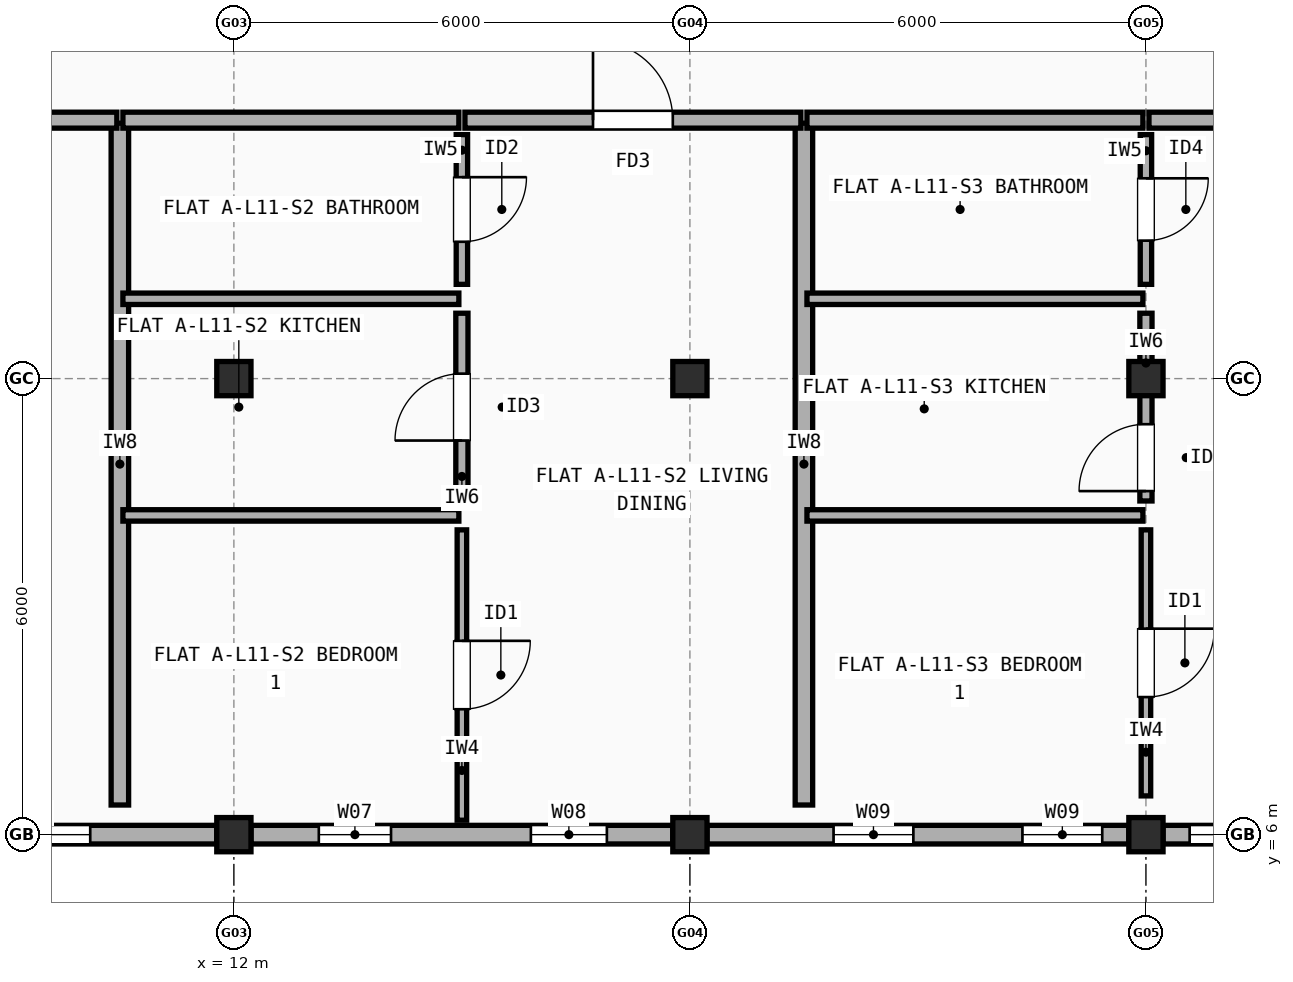
"""IFC4 building model, lengths in metres.
Left out: names, types, materials, properties, quantities, classifications, styles, units other than length and angle.
Written with IfcOpenShell. Run it as: python <this file> out.ifc"""

import sys

from ifc_helpers import new_model, si_unit, direction, frame, frame_2d, origin, origin_2d, place, context, subcontext, project, spatial, rectangle, extrude, element, fill, save


model = new_model("IFC4")
c1 = context("Model", 3, precision=1e-05, world=origin(), true_north=direction((0.0, 1.0)))
c2 = subcontext(c1, "Body", "Model", "MODEL_VIEW")
j1 = project(units=[si_unit("LENGTHUNIT", "METRE"), si_unit("PLANEANGLEUNIT", "RADIAN")], contexts=[c1])
p1 = place(None, origin())
s1 = spatial("IfcSite", under=j1, at=p1, CompositionType="ELEMENT")
p2 = place(p1, origin())
s2 = spatial("IfcBuilding", under=s1, at=p2, CompositionType="ELEMENT")
p3 = place(p2, frame((0.0, 0.0, 36.5)))
s3 = spatial("IfcBuildingStorey", under=s2, at=p3, CompositionType="ELEMENT", Elevation=36.5)
for number, where, z_axis, x_axis in (
    (1, (12.0, 6.0, 0.0), (0.0, 0.0, 1.0), (1.0, 0.0, 0.0)),
    (2, (12.0, 12.0, 0.0), (0.0, 0.0, 1.0), (1.0, 0.0, 0.0)),
    (3, (18.0, 6.0, 0.0), (0.0, 0.0, 1.0), (1.0, 0.0, 0.0)),
    (4, (18.0, 12.0, 0.0), (0.0, 0.0, 1.0), (1.0, 0.0, 0.0)),
    (5, (24.0, 6.0, 0.0), (0.0, 0.0, 1.0), (1.0, 0.0, 0.0)),
    (6, (24.0, 12.0, 0.0), (0.0, 0.0, 1.0), (1.0, 0.0, 0.0)),
):
    element("IfcColumn", number, at=place(p3, frame(where, z_axis=z_axis, x_axis=x_axis)), inside=s3, PredefinedType="COLUMN", context=c2, shape_type="SweptSolid", body=[
        extrude(rectangle(XDim=0.45, YDim=0.45, at=origin_2d()), origin(), (0.0, 0.0, 1.0), 2.995),
    ])
p4 = place(p3, frame((6.225, 6.0, 0.0), z_axis=(0.0, 0.0, 1.0), x_axis=(1.0, 0.0, 0.0)))
e7 = element("IfcWall", 7, at=p4, inside=s3, PredefinedType="STANDARD", context=c2, shape_type="SweptSolid", body=[
    extrude(rectangle(XDim=5.55, YDim=0.245, at=frame_2d((2.775, 0.0))), origin(), (0.0, 0.0, 1.0), 2.477),
])
p5 = place(p4, frame((0.35, 0.0, 0.9)))
e8 = element("IfcOpeningElement", 8, at=p5, cuts=e7, PredefinedType="OPENING", context=c2, shape_type="SweptSolid", body=[
    extrude(rectangle(XDim=1.5, YDim=1.4, at=frame_2d((0.75, 0.7))), frame((0.0, 0.133, 0.0), z_axis=(0.0, -1.0, 0.0), x_axis=(1.0, 0.0, 0.0)), (0.0, 0.0, 1.0), 0.265),
])
p6 = place(p4, frame((2.385, 0.0, 0.9)))
e9 = element("IfcOpeningElement", 9, at=p6, cuts=e7, PredefinedType="OPENING", context=c2, shape_type="SweptSolid", body=[
    extrude(rectangle(XDim=1.5, YDim=1.4, at=frame_2d((0.75, 0.7))), frame((0.0, 0.133, 0.0), z_axis=(0.0, -1.0, 0.0), x_axis=(1.0, 0.0, 0.0)), (0.0, 0.0, 1.0), 0.265),
])
p7 = place(p3, frame((12.225, 6.0, 0.0), z_axis=(0.0, 0.0, 1.0), x_axis=(1.0, 0.0, 0.0)))
e10 = element("IfcWall", 10, at=p7, inside=s3, PredefinedType="STANDARD", context=c2, shape_type="SweptSolid", body=[
    extrude(rectangle(XDim=5.55, YDim=0.245, at=frame_2d((2.775, 0.0))), origin(), (0.0, 0.0, 1.0), 2.477),
])
p8 = place(p7, frame((0.893, 0.0, 0.9)))
e11 = element("IfcOpeningElement", 11, at=p8, cuts=e10, PredefinedType="OPENING", context=c2, shape_type="SweptSolid", body=[
    extrude(rectangle(XDim=0.95, YDim=1.35, at=frame_2d((0.475, 0.675))), frame((0.0, 0.133, 0.0), z_axis=(0.0, -1.0, 0.0), x_axis=(1.0, 0.0, 0.0)), (0.0, 0.0, 1.0), 0.265),
])
p9 = place(p7, frame((3.683, 0.0, 0.9)))
e12 = element("IfcOpeningElement", 12, at=p9, cuts=e10, PredefinedType="OPENING", context=c2, shape_type="SweptSolid", body=[
    extrude(rectangle(XDim=1.0, YDim=1.4, at=frame_2d((0.5, 0.7))), frame((0.0, 0.133, 0.0), z_axis=(0.0, -1.0, 0.0), x_axis=(1.0, 0.0, 0.0)), (0.0, 0.0, 1.0), 0.265),
])
p10 = place(p3, frame((18.225, 6.0, 0.0), z_axis=(0.0, 0.0, 1.0), x_axis=(1.0, 0.0, 0.0)))
e13 = element("IfcWall", 13, at=p10, inside=s3, PredefinedType="STANDARD", context=c2, shape_type="SweptSolid", body=[
    extrude(rectangle(XDim=5.55, YDim=0.245, at=frame_2d((2.775, 0.0))), origin(), (0.0, 0.0, 1.0), 2.477),
])
p11 = place(p10, frame((1.665, 0.0, 0.9)))
e14 = element("IfcOpeningElement", 14, at=p11, cuts=e13, PredefinedType="OPENING", context=c2, shape_type="SweptSolid", body=[
    extrude(rectangle(XDim=1.05, YDim=1.35, at=frame_2d((0.525, 0.675))), frame((0.0, 0.133, 0.0), z_axis=(0.0, -1.0, 0.0), x_axis=(1.0, 0.0, 0.0)), (0.0, 0.0, 1.0), 0.265),
])
p12 = place(p10, frame((4.15, 0.0, 0.9)))
e15 = element("IfcOpeningElement", 15, at=p12, cuts=e13, PredefinedType="OPENING", context=c2, shape_type="SweptSolid", body=[
    extrude(rectangle(XDim=1.05, YDim=1.35, at=frame_2d((0.525, 0.675))), frame((0.0, 0.133, 0.0), z_axis=(0.0, -1.0, 0.0), x_axis=(1.0, 0.0, 0.0)), (0.0, 0.0, 1.0), 0.265),
])
p13 = place(p3, frame((24.225, 6.0, 0.0), z_axis=(0.0, 0.0, 1.0), x_axis=(1.0, 0.0, 0.0)))
e16 = element("IfcWall", 16, at=p13, inside=s3, PredefinedType="STANDARD", context=c2, shape_type="SweptSolid", body=[
    extrude(rectangle(XDim=5.575, YDim=0.245, at=frame_2d((2.788, 0.0))), origin(), (0.0, 0.0, 1.0), 2.477),
])
p14 = place(p13, frame((0.35, 0.0, 0.9)))
e17 = element("IfcOpeningElement", 17, at=p14, cuts=e16, PredefinedType="OPENING", context=c2, shape_type="SweptSolid", body=[
    extrude(rectangle(XDim=1.5, YDim=1.4, at=frame_2d((0.75, 0.7))), frame((0.0, 0.133, 0.0), z_axis=(0.0, -1.0, 0.0), x_axis=(1.0, 0.0, 0.0)), (0.0, 0.0, 1.0), 0.265),
])
p15 = place(p13, frame((3.725, 0.0, 0.9)))
e18 = element("IfcOpeningElement", 18, at=p15, cuts=e16, PredefinedType="OPENING", context=c2, shape_type="SweptSolid", body=[
    extrude(rectangle(XDim=1.5, YDim=1.4, at=frame_2d((0.75, 0.7))), frame((0.0, 0.133, 0.0), z_axis=(0.0, -1.0, 0.0), x_axis=(1.0, 0.0, 0.0)), (0.0, 0.0, 1.0), 0.265),
])
p16 = place(p3, frame((10.5, 6.39, 0.0), z_axis=(0.0, 0.0, 1.0), x_axis=(0.0, 1.0, 0.0)))
e19 = element("IfcWall", 19, at=p16, inside=s3, PredefinedType="SOLIDWALL", context=c2, shape_type="SweptSolid", body=[
    extrude(rectangle(XDim=8.97, YDim=0.23, at=frame_2d((4.485, 0.0))), origin(), (0.0, 0.0, 1.0), 2.527),
])
p17 = place(p3, frame((4.54, 15.4, 0.0), z_axis=(0.0, 0.0, 1.0), x_axis=(1.0, 0.0, 0.0)))
e20 = element("IfcWall", 20, at=p17, inside=s3, PredefinedType="SOLIDWALL", context=c2, shape_type="SweptSolid", body=[
    extrude(rectangle(XDim=5.92, YDim=0.21, at=frame_2d((2.96, 0.0))), origin(), (0.0, 0.0, 1.0), 2.458),
])
p18 = place(p17, frame((2.47, 0.0, 0.0)))
e21 = element("IfcOpeningElement", 21, at=p18, cuts=e20, PredefinedType="OPENING", context=c2, shape_type="SweptSolid", body=[
    extrude(rectangle(XDim=0.98, YDim=2.15, at=frame_2d((0.49, 1.075))), frame((0.0, 0.115, 0.0), z_axis=(0.0, -1.0, 0.0), x_axis=(1.0, 0.0, 0.0)), (0.0, 0.0, 1.0), 0.23),
])
p19 = place(p3, frame((19.5, 6.39, 0.0), z_axis=(0.0, 0.0, 1.0), x_axis=(0.0, 1.0, 0.0)))
e22 = element("IfcWall", 22, at=p19, inside=s3, PredefinedType="SOLIDWALL", context=c2, shape_type="SweptSolid", body=[
    extrude(rectangle(XDim=8.97, YDim=0.23, at=frame_2d((4.485, 0.0))), origin(), (0.0, 0.0, 1.0), 2.527),
])
p20 = place(p3, frame((10.54, 15.4, 0.0), z_axis=(0.0, 0.0, 1.0), x_axis=(1.0, 0.0, 0.0)))
e23 = element("IfcWall", 23, at=p20, inside=s3, PredefinedType="SOLIDWALL", context=c2, shape_type="SweptSolid", body=[
    extrude(rectangle(XDim=4.42, YDim=0.21, at=frame_2d((2.21, 0.0))), origin(), (0.0, 0.0, 1.0), 2.458),
])
p21 = place(p3, frame((15.04, 15.4, 0.0), z_axis=(0.0, 0.0, 1.0), x_axis=(1.0, 0.0, 0.0)))
e24 = element("IfcWall", 24, at=p21, inside=s3, PredefinedType="SOLIDWALL", context=c2, shape_type="SweptSolid", body=[
    extrude(rectangle(XDim=4.42, YDim=0.21, at=frame_2d((2.21, 0.0))), origin(), (0.0, 0.0, 1.0), 2.548),
])
p22 = place(p21, frame((1.685, 0.0, 0.0)))
e25 = element("IfcOpeningElement", 25, at=p22, cuts=e24, PredefinedType="OPENING", context=c2, shape_type="SweptSolid", body=[
    extrude(rectangle(XDim=1.05, YDim=2.15, at=frame_2d((0.525, 1.075))), frame((0.0, 0.115, 0.0), z_axis=(0.0, -1.0, 0.0), x_axis=(1.0, 0.0, 0.0)), (0.0, 0.0, 1.0), 0.23),
])
p23 = place(p3, frame((15.0, 6.19, 0.0), z_axis=(0.0, 0.0, 1.0), x_axis=(0.0, 1.0, 0.0)))
e26 = element("IfcWall", 26, at=p23, inside=s3, PredefinedType="PARTITIONING", context=c2, shape_type="SweptSolid", body=[
    extrude(rectangle(XDim=3.82, YDim=0.125, at=frame_2d((1.91, 0.0))), origin(), (0.0, 0.0, 1.0), 2.995),
])
p24 = place(p23, frame((1.46, 0.0, 0.0)))
e27 = element("IfcOpeningElement", 27, at=p24, cuts=e26, PredefinedType="OPENING", context=c2, shape_type="SweptSolid", body=[
    extrude(rectangle(XDim=0.9, YDim=2.1, at=frame_2d((0.45, 1.05))), frame((0.0, 0.073, 0.0), z_axis=(0.0, -1.0, 0.0), x_axis=(1.0, 0.0, 0.0)), (0.0, 0.0, 1.0), 0.145),
])
p25 = place(p3, frame((15.0, 10.39, 0.0), z_axis=(0.0, 0.0, 1.0), x_axis=(0.0, 1.0, 0.0)))
e28 = element("IfcWall", 28, at=p25, inside=s3, PredefinedType="PLUMBINGWALL", context=c2, shape_type="SweptSolid", body=[
    extrude(rectangle(XDim=2.47, YDim=0.16, at=frame_2d((1.235, 0.0))), origin(), (0.0, 0.0, 1.0), 2.527),
])
p26 = place(p25, frame((0.795, 0.0, 0.0)))
e29 = element("IfcOpeningElement", 29, at=p26, cuts=e28, PredefinedType="OPENING", context=c2, shape_type="SweptSolid", body=[
    extrude(rectangle(XDim=0.88, YDim=2.1, at=frame_2d((0.44, 1.05))), frame((0.0, 0.09, 0.0), z_axis=(0.0, -1.0, 0.0), x_axis=(1.0, 0.0, 0.0)), (0.0, 0.0, 1.0), 0.18),
])
p27 = place(p3, frame((15.0, 13.24, 0.0), z_axis=(0.0, 0.0, 1.0), x_axis=(0.0, 1.0, 0.0)))
e30 = element("IfcWall", 30, at=p27, inside=s3, PredefinedType="PARTITIONING", context=c2, shape_type="SweptSolid", body=[
    extrude(rectangle(XDim=1.97, YDim=0.15, at=frame_2d((0.985, 0.0))), origin(), (0.0, 0.0, 1.0), 2.995),
])
p28 = place(p27, frame((0.56, 0.0, 0.0)))
e31 = element("IfcOpeningElement", 31, at=p28, cuts=e30, PredefinedType="OPENING", context=c2, shape_type="SweptSolid", body=[
    extrude(rectangle(XDim=0.85, YDim=2.1, at=frame_2d((0.425, 1.05))), frame((0.0, 0.085, 0.0), z_axis=(0.0, -1.0, 0.0), x_axis=(1.0, 0.0, 0.0)), (0.0, 0.0, 1.0), 0.17),
])
p29 = place(p3, frame((10.54, 10.2, 0.0), z_axis=(0.0, 0.0, 1.0), x_axis=(1.0, 0.0, 0.0)))
e32 = element("IfcWall", 32, at=p29, inside=s3, PredefinedType="PARTITIONING", context=c2, shape_type="SweptSolid", body=[
    extrude(rectangle(XDim=4.42, YDim=0.15, at=frame_2d((2.21, 0.0))), origin(), (0.0, 0.0, 1.0), 2.508),
])
p30 = place(p3, frame((10.54, 13.05, 0.0), z_axis=(0.0, 0.0, 1.0), x_axis=(1.0, 0.0, 0.0)))
e33 = element("IfcWall", 33, at=p30, inside=s3, PredefinedType="PARTITIONING", context=c2, shape_type="SweptSolid", body=[
    extrude(rectangle(XDim=4.42, YDim=0.15, at=frame_2d((2.21, 0.0))), origin(), (0.0, 0.0, 1.0), 2.458),
])
p31 = place(p3, frame((19.54, 15.4, 0.0), z_axis=(0.0, 0.0, 1.0), x_axis=(1.0, 0.0, 0.0)))
e34 = element("IfcWall", 34, at=p31, inside=s3, PredefinedType="SOLIDWALL", context=c2, shape_type="SweptSolid", body=[
    extrude(rectangle(XDim=4.42, YDim=0.21, at=frame_2d((2.21, 0.0))), origin(), (0.0, 0.0, 1.0), 2.548),
])
p32 = place(p3, frame((24.04, 15.4, 0.0), z_axis=(0.0, 0.0, 1.0), x_axis=(1.0, 0.0, 0.0)))
e35 = element("IfcWall", 35, at=p32, inside=s3, PredefinedType="SOLIDWALL", context=c2, shape_type="SweptSolid", body=[
    extrude(rectangle(XDim=5.92, YDim=0.21, at=frame_2d((2.96, 0.0))), origin(), (0.0, 0.0, 1.0), 2.477),
])
p33 = place(p32, frame((2.46, 0.0, 0.0)))
e36 = element("IfcOpeningElement", 36, at=p33, cuts=e35, PredefinedType="OPENING", context=c2, shape_type="SweptSolid", body=[
    extrude(rectangle(XDim=1.0, YDim=2.15, at=frame_2d((0.5, 1.075))), frame((0.0, 0.115, 0.0), z_axis=(0.0, -1.0, 0.0), x_axis=(1.0, 0.0, 0.0)), (0.0, 0.0, 1.0), 0.23),
])
p34 = place(p3, frame((24.0, 6.51, 0.0), z_axis=(0.0, 0.0, 1.0), x_axis=(0.0, 1.0, 0.0)))
e37 = element("IfcWall", 37, at=p34, inside=s3, PredefinedType="PARTITIONING", context=c2, shape_type="SweptSolid", body=[
    extrude(rectangle(XDim=3.5, YDim=0.125, at=frame_2d((1.75, 0.0))), origin(), (0.0, 0.0, 1.0), 2.458),
])
p35 = place(p34, frame((1.3, 0.0, 0.0)))
e38 = element("IfcOpeningElement", 38, at=p35, cuts=e37, PredefinedType="OPENING", context=c2, shape_type="SweptSolid", body=[
    extrude(rectangle(XDim=0.9, YDim=2.1, at=frame_2d((0.45, 1.05))), frame((0.0, 0.073, 0.0), z_axis=(0.0, -1.0, 0.0), x_axis=(1.0, 0.0, 0.0)), (0.0, 0.0, 1.0), 0.145),
])
p36 = place(p3, frame((24.0, 10.39, 0.0), z_axis=(0.0, 0.0, 1.0), x_axis=(0.0, 1.0, 0.0)))
e39 = element("IfcWall", 39, at=p36, inside=s3, PredefinedType="PLUMBINGWALL", context=c2, shape_type="SweptSolid", body=[
    extrude(rectangle(XDim=2.47, YDim=0.16, at=frame_2d((1.235, 0.0))), origin(), (0.0, 0.0, 1.0), 2.458),
])
p37 = place(p36, frame((0.13, 0.0, 0.0)))
e40 = element("IfcOpeningElement", 40, at=p37, cuts=e39, PredefinedType="OPENING", context=c2, shape_type="SweptSolid", body=[
    extrude(rectangle(XDim=0.88, YDim=2.1, at=frame_2d((0.44, 1.05))), frame((0.0, 0.09, 0.0), z_axis=(0.0, -1.0, 0.0), x_axis=(1.0, 0.0, 0.0)), (0.0, 0.0, 1.0), 0.18),
])
p38 = place(p3, frame((24.0, 13.24, 0.0), z_axis=(0.0, 0.0, 1.0), x_axis=(0.0, 1.0, 0.0)))
e41 = element("IfcWall", 41, at=p38, inside=s3, PredefinedType="PARTITIONING", context=c2, shape_type="SweptSolid", body=[
    extrude(rectangle(XDim=1.97, YDim=0.15, at=frame_2d((0.985, 0.0))), origin(), (0.0, 0.0, 1.0), 2.548),
])
p39 = place(p38, frame((0.575, 0.0, 0.0)))
e42 = element("IfcOpeningElement", 42, at=p39, cuts=e41, PredefinedType="OPENING", context=c2, shape_type="SweptSolid", body=[
    extrude(rectangle(XDim=0.82, YDim=2.08, at=frame_2d((0.41, 1.04))), frame((0.0, 0.085, 0.0), z_axis=(0.0, -1.0, 0.0), x_axis=(1.0, 0.0, 0.0)), (0.0, 0.0, 1.0), 0.17),
])
p40 = place(p3, frame((19.54, 10.2, 0.0), z_axis=(0.0, 0.0, 1.0), x_axis=(1.0, 0.0, 0.0)))
e43 = element("IfcWall", 43, at=p40, inside=s3, PredefinedType="PARTITIONING", context=c2, shape_type="SweptSolid", body=[
    extrude(rectangle(XDim=4.42, YDim=0.15, at=frame_2d((2.21, 0.0))), origin(), (0.0, 0.0, 1.0), 2.458),
])
p41 = place(p3, frame((19.54, 13.05, 0.0), z_axis=(0.0, 0.0, 1.0), x_axis=(1.0, 0.0, 0.0)))
e44 = element("IfcWall", 44, at=p41, inside=s3, PredefinedType="PARTITIONING", context=c2, shape_type="SweptSolid", body=[
    extrude(rectangle(XDim=4.42, YDim=0.15, at=frame_2d((2.21, 0.0))), origin(), (0.0, 0.0, 1.0), 2.548),
])
p42 = place(p6, origin())
e45 = element("IfcWindow", 45, at=p42, inside=s3, PartitioningType="SINGLE_PANEL", PredefinedType="WINDOW", context=c2, shape_type="SweptSolid", body=[
    extrude(rectangle(XDim=1.5, YDim=1.4, at=frame_2d((0.75, 0.7))), frame((0.0, 0.03, 0.0), z_axis=(0.0, -1.0, 0.0), x_axis=(1.0, 0.0, 0.0)), (0.0, 0.0, 1.0), 0.06),
])
fill(e9, e45)
p43 = place(p8, origin())
e46 = element("IfcWindow", 46, at=p43, inside=s3, PartitioningType="SINGLE_PANEL", PredefinedType="WINDOW", context=c2, shape_type="SweptSolid", body=[
    extrude(rectangle(XDim=0.95, YDim=1.35, at=frame_2d((0.475, 0.675))), frame((0.0, 0.03, 0.0), z_axis=(0.0, -1.0, 0.0), x_axis=(1.0, 0.0, 0.0)), (0.0, 0.0, 1.0), 0.06),
])
fill(e11, e46)
p44 = place(p9, origin())
e47 = element("IfcWindow", 47, at=p44, inside=s3, PartitioningType="SINGLE_PANEL", PredefinedType="WINDOW", context=c2, shape_type="SweptSolid", body=[
    extrude(rectangle(XDim=1.0, YDim=1.4, at=frame_2d((0.5, 0.7))), frame((0.0, 0.03, 0.0), z_axis=(0.0, -1.0, 0.0), x_axis=(1.0, 0.0, 0.0)), (0.0, 0.0, 1.0), 0.06),
])
fill(e12, e47)
p45 = place(p11, origin())
e48 = element("IfcWindow", 48, at=p45, inside=s3, PartitioningType="SINGLE_PANEL", PredefinedType="WINDOW", context=c2, shape_type="SweptSolid", body=[
    extrude(rectangle(XDim=1.05, YDim=1.35, at=frame_2d((0.525, 0.675))), frame((0.0, 0.03, 0.0), z_axis=(0.0, -1.0, 0.0), x_axis=(1.0, 0.0, 0.0)), (0.0, 0.0, 1.0), 0.06),
])
fill(e14, e48)
p46 = place(p12, origin())
e49 = element("IfcWindow", 49, at=p46, inside=s3, PartitioningType="SINGLE_PANEL", PredefinedType="WINDOW", context=c2, shape_type="SweptSolid", body=[
    extrude(rectangle(XDim=1.05, YDim=1.35, at=frame_2d((0.525, 0.675))), frame((0.0, 0.03, 0.0), z_axis=(0.0, -1.0, 0.0), x_axis=(1.0, 0.0, 0.0)), (0.0, 0.0, 1.0), 0.06),
])
fill(e15, e49)
p47 = place(p14, origin())
e50 = element("IfcWindow", 50, at=p47, inside=s3, PartitioningType="SINGLE_PANEL", PredefinedType="WINDOW", context=c2, shape_type="SweptSolid", body=[
    extrude(rectangle(XDim=1.5, YDim=1.4, at=frame_2d((0.75, 0.7))), frame((0.0, 0.03, 0.0), z_axis=(0.0, -1.0, 0.0), x_axis=(1.0, 0.0, 0.0)), (0.0, 0.0, 1.0), 0.06),
])
fill(e17, e50)
p48 = place(p22, origin())
e51 = element("IfcDoor", 51, at=p48, inside=s3, OperationType="SINGLE_SWING_LEFT", PredefinedType="DOOR", context=c2, shape_type="SweptSolid", body=[
    extrude(rectangle(XDim=1.05, YDim=2.15, at=frame_2d((0.525, 1.075))), frame((0.0, 0.025, 0.0), z_axis=(0.0, -1.0, 0.0), x_axis=(1.0, 0.0, 0.0)), (0.0, 0.0, 1.0), 0.05),
])
fill(e25, e51)
p49 = place(p24, origin())
e52 = element("IfcDoor", 52, at=p49, inside=s3, OperationType="SINGLE_SWING_RIGHT", PredefinedType="DOOR", context=c2, shape_type="SweptSolid", body=[
    extrude(rectangle(XDim=0.9, YDim=2.1, at=frame_2d((0.45, 1.05))), frame((0.0, 0.025, 0.0), z_axis=(0.0, -1.0, 0.0), x_axis=(1.0, 0.0, 0.0)), (0.0, 0.0, 1.0), 0.05),
])
fill(e27, e52)
p50 = place(p26, origin())
e53 = element("IfcDoor", 53, at=p50, inside=s3, OperationType="SINGLE_SWING_LEFT", PredefinedType="DOOR", context=c2, shape_type="SweptSolid", body=[
    extrude(rectangle(XDim=0.88, YDim=2.1, at=frame_2d((0.44, 1.05))), frame((0.0, 0.025, 0.0), z_axis=(0.0, -1.0, 0.0), x_axis=(1.0, 0.0, 0.0)), (0.0, 0.0, 1.0), 0.05),
])
fill(e29, e53)
p51 = place(p28, origin())
e54 = element("IfcDoor", 54, at=p51, inside=s3, OperationType="SINGLE_SWING_RIGHT", PredefinedType="DOOR", context=c2, shape_type="SweptSolid", body=[
    extrude(rectangle(XDim=0.85, YDim=2.1, at=frame_2d((0.425, 1.05))), frame((0.0, 0.025, 0.0), z_axis=(0.0, -1.0, 0.0), x_axis=(1.0, 0.0, 0.0)), (0.0, 0.0, 1.0), 0.05),
])
fill(e31, e54)
p52 = place(p35, origin())
e55 = element("IfcDoor", 55, at=p52, inside=s3, OperationType="SINGLE_SWING_RIGHT", PredefinedType="DOOR", context=c2, shape_type="SweptSolid", body=[
    extrude(rectangle(XDim=0.9, YDim=2.1, at=frame_2d((0.45, 1.05))), frame((0.0, 0.025, 0.0), z_axis=(0.0, -1.0, 0.0), x_axis=(1.0, 0.0, 0.0)), (0.0, 0.0, 1.0), 0.05),
])
fill(e38, e55)
p53 = place(p37, origin())
e56 = element("IfcDoor", 56, at=p53, inside=s3, OperationType="SINGLE_SWING_LEFT", PredefinedType="DOOR", context=c2, shape_type="SweptSolid", body=[
    extrude(rectangle(XDim=0.88, YDim=2.1, at=frame_2d((0.44, 1.05))), frame((0.0, 0.025, 0.0), z_axis=(0.0, -1.0, 0.0), x_axis=(1.0, 0.0, 0.0)), (0.0, 0.0, 1.0), 0.05),
])
fill(e40, e56)
p54 = place(p39, origin())
e57 = element("IfcDoor", 57, at=p54, inside=s3, OperationType="SINGLE_SWING_RIGHT", PredefinedType="DOOR", context=c2, shape_type="SweptSolid", body=[
    extrude(rectangle(XDim=0.82, YDim=2.08, at=frame_2d((0.41, 1.04))), frame((0.0, 0.025, 0.0), z_axis=(0.0, -1.0, 0.0), x_axis=(1.0, 0.0, 0.0)), (0.0, 0.0, 1.0), 0.05),
])
fill(e42, e57)
save(model, sys.argv[1])
